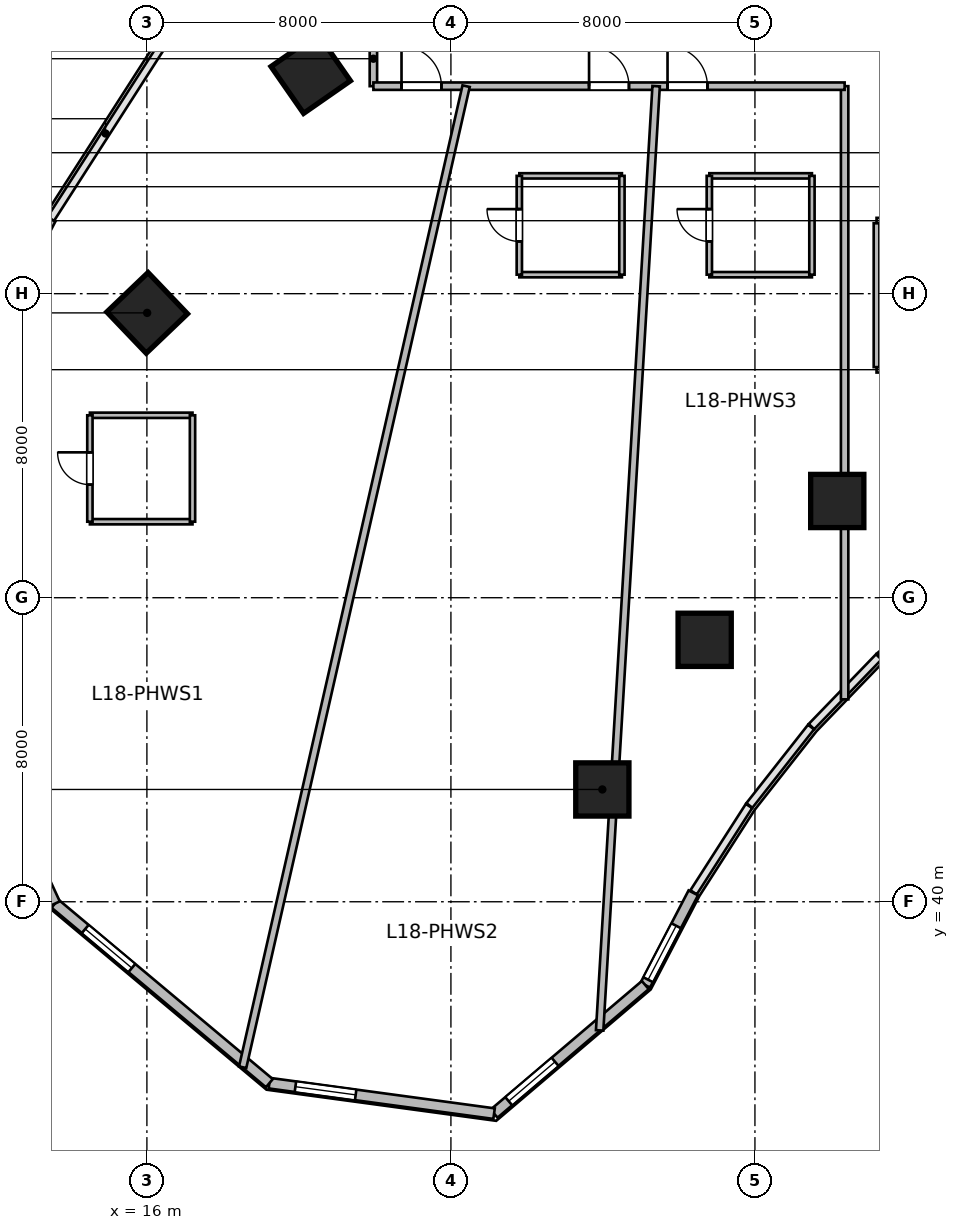
"""IFC4 building model, lengths in metres.
Left out: names, types, materials, properties, quantities, classifications, styles, units other than length and angle.
Written with IfcOpenShell. Run it as: python <this file> out.ifc"""

import sys

from ifc_helpers import new_model, si_unit, direction, frame, frame_2d, origin, origin_2d, place, context, subcontext, project, spatial, rectangle, circle, extrude, source, transform, mapped, element, fill, save


model = new_model("IFC4")
c1 = context("Model", 3, precision=1e-05, world=origin(), true_north=direction((0.0, 1.0)))
c2 = subcontext(c1, "Body", "Model", "MODEL_VIEW")
j1 = project(units=[si_unit("LENGTHUNIT", "METRE"), si_unit("PLANEANGLEUNIT", "RADIAN")], contexts=[c1])
p1 = place(None, origin())
s1 = spatial("IfcSite", under=j1, at=p1, CompositionType="ELEMENT")
p2 = place(p1, origin())
s2 = spatial("IfcBuilding", under=s1, at=p2, CompositionType="ELEMENT")
p3 = place(p2, frame((0.0, 0.0, 78.6)))
s3 = spatial("IfcBuildingStorey", under=s2, at=p3, CompositionType="ELEMENT", Elevation=78.6)
m1 = source(origin(), c2, "Body", "SweptSolid", [
    extrude(circle(Radius=0.7, at=origin_2d()), origin(), (0.0, 0.0, 1.0), 3.6),
])
p4 = place(p3, frame((27.985, 42.955, 0.0), z_axis=(0.0, 0.0, 1.0), x_axis=(-0.690756218984, 0.723087716626, 0.0)))
e1 = element("IfcColumn", 1, at=p4, inside=s3, PredefinedType="COLUMN", context=c2, shape_type="MappedRepresentation", body=[
    mapped(m1, transform((0.0, 0.0, 0.0), scale=1.0)),
])
m2 = source(origin(), c2, "Body", "SweptSolid", [
    extrude(rectangle(XDim=1.5, YDim=1.5, at=origin_2d()), origin(), (0.0, 0.0, 1.0), 3.6),
])
p5 = place(p3, frame((16.007, 55.494, 0.0), z_axis=(0.0, 0.0, 1.0), x_axis=(-0.690756218984, 0.723087716626, 0.0)))
e2 = element("IfcColumn", 2, at=p5, inside=s3, PredefinedType="COLUMN", context=c2, shape_type="MappedRepresentation", body=[
    mapped(m2, transform((0.0, 0.0, 0.0), scale=1.0)),
])
p6 = place(p3, frame((30.677, 46.892, 0.0), z_axis=(0.0, 0.0, 1.0), x_axis=(-0.571143442153, 0.820850271661, 0.0)))
e3 = element("IfcColumn", 3, at=p6, inside=s3, PredefinedType="COLUMN", context=c2, shape_type="MappedRepresentation", body=[
    mapped(m1, transform((0.0, 0.0, 0.0), scale=1.0)),
])
p7 = place(p3, frame((20.311, 61.789, 0.0), z_axis=(0.0, 0.0, 1.0), x_axis=(-0.571143442153, 0.820850271661, 0.0)))
e4 = element("IfcColumn", 4, at=p7, inside=s3, PredefinedType="COLUMN", context=c2, shape_type="MappedRepresentation", body=[
    mapped(m2, transform((0.0, 0.0, 0.0), scale=1.0)),
])
p8 = place(p3, frame((34.166, 50.545, 0.0), z_axis=(0.0, 0.0, 1.0), x_axis=(-0.436173672171, 0.899862504889, 0.0)))
e5 = element("IfcColumn", 5, at=p8, inside=s3, PredefinedType="COLUMN", context=c2, shape_type="MappedRepresentation", body=[
    mapped(m1, transform((0.0, 0.0, 0.0), scale=1.0)),
])
m3 = source(origin(), c2, "Body", "SweptSolid", [
    extrude(rectangle(XDim=2.735, YDim=0.28, at=frame_2d((1.368, 0.0))), origin(), (0.0, 0.0, 1.0), 3.36),
])
p9 = place(p3, frame((30.378, 40.234, 0.0), z_axis=(0.0, 0.0, 1.0), x_axis=(-0.46179107292, -0.886988728774, 0.0)))
e6 = element("IfcWall", 6, at=p9, inside=s3, PredefinedType="SOLIDWALL", context=c2, shape_type="MappedRepresentation", body=[
    mapped(m3, transform((0.0, 0.0, 0.0), scale=1.0)),
])
p10 = place(p9, frame((0.976, 0.0, 0.95)))
e7 = element("IfcOpeningElement", 7, at=p10, cuts=e6, PredefinedType="OPENING", context=c2, shape_type="SweptSolid", body=[
    extrude(rectangle(XDim=1.6, YDim=1.9, at=frame_2d((0.8, 0.95))), frame((0.0, 0.15, 0.0), z_axis=(0.0, -1.0, 0.0), x_axis=(1.0, 0.0, 0.0)), (0.0, 0.0, 1.0), 0.3),
])
m4 = source(origin(), c2, "Body", "SweptSolid", [
    extrude(rectangle(XDim=5.222, YDim=0.28, at=frame_2d((2.611, 0.0))), origin(), (0.0, 0.0, 1.0), 3.36),
])
p11 = place(p3, frame((29.115, 37.807, 0.0), z_axis=(0.0, 0.0, 1.0), x_axis=(-0.761900099546, -0.647694556339, 0.0)))
e8 = element("IfcWall", 8, at=p11, inside=s3, PredefinedType="SOLIDWALL", context=c2, shape_type="MappedRepresentation", body=[
    mapped(m4, transform((0.0, 0.0, 0.0), scale=1.0)),
])
p12 = place(p11, frame((3.117, 0.0, 0.95)))
e9 = element("IfcOpeningElement", 9, at=p12, cuts=e8, PredefinedType="OPENING", context=c2, shape_type="SweptSolid", body=[
    extrude(rectangle(XDim=1.6, YDim=1.9, at=frame_2d((0.8, 0.95))), frame((0.0, 0.15, 0.0), z_axis=(0.0, -1.0, 0.0), x_axis=(1.0, 0.0, 0.0)), (0.0, 0.0, 1.0), 0.3),
])
m5 = source(origin(), c2, "Body", "SweptSolid", [
    extrude(rectangle(XDim=5.967, YDim=0.28, at=frame_2d((2.984, 0.0))), origin(), (0.0, 0.0, 1.0), 3.36),
])
p13 = place(p3, frame((25.136, 34.425, 0.0), z_axis=(0.0, 0.0, 1.0), x_axis=(-0.990927009341, 0.134401124099, 0.0)))
e10 = element("IfcWall", 10, at=p13, inside=s3, PredefinedType="SOLIDWALL", context=c2, shape_type="MappedRepresentation", body=[
    mapped(m5, transform((0.0, 0.0, 0.0), scale=1.0)),
])
p14 = place(p13, frame((3.676, 0.0, 0.95)))
e11 = element("IfcOpeningElement", 11, at=p14, cuts=e10, PredefinedType="OPENING", context=c2, shape_type="SweptSolid", body=[
    extrude(rectangle(XDim=1.6, YDim=1.9, at=frame_2d((0.8, 0.95))), frame((0.0, 0.15, 0.0), z_axis=(0.0, -1.0, 0.0), x_axis=(1.0, 0.0, 0.0)), (0.0, 0.0, 1.0), 0.3),
])
m6 = source(origin(), c2, "Body", "SweptSolid", [
    extrude(rectangle(XDim=7.359, YDim=0.28, at=frame_2d((3.679, 0.0))), origin(), (0.0, 0.0, 1.0), 3.36),
])
p15 = place(p3, frame((19.223, 35.227, 0.0), z_axis=(0.0, 0.0, 1.0), x_axis=(-0.766737165543, 0.641961150675, 0.0)))
e12 = element("IfcWall", 12, at=p15, inside=s3, PredefinedType="SOLIDWALL", context=c2, shape_type="MappedRepresentation", body=[
    mapped(m6, transform((0.0, 0.0, 0.0), scale=1.0)),
])
p16 = place(p15, frame((4.719, 0.0, 0.95)))
e13 = element("IfcOpeningElement", 13, at=p16, cuts=e12, PredefinedType="OPENING", context=c2, shape_type="SweptSolid", body=[
    extrude(rectangle(XDim=1.6, YDim=1.9, at=frame_2d((0.8, 0.95))), frame((0.0, 0.15, 0.0), z_axis=(0.0, -1.0, 0.0), x_axis=(1.0, 0.0, 0.0)), (0.0, 0.0, 1.0), 0.3),
])
m7 = source(origin(), c2, "Body", "SweptSolid", [
    extrude(rectangle(XDim=7.536, YDim=0.28, at=frame_2d((3.768, 0.0))), origin(), (0.0, 0.0, 1.0), 3.36),
])
p17 = place(p3, frame((13.58, 39.951, 0.0), z_axis=(0.0, 0.0, 1.0), x_axis=(-0.41964973873, 0.907686122393, 0.0)))
e14 = element("IfcWall", 14, at=p17, inside=s3, PredefinedType="SOLIDWALL", context=c2, shape_type="MappedRepresentation", body=[
    mapped(m7, transform((0.0, 0.0, 0.0), scale=1.0)),
])
p18 = place(p17, frame((1.084, 0.0, 0.95)))
e15 = element("IfcOpeningElement", 15, at=p18, cuts=e14, PredefinedType="OPENING", context=c2, shape_type="SweptSolid", body=[
    extrude(rectangle(XDim=1.6, YDim=1.9, at=frame_2d((0.8, 0.95))), frame((0.0, 0.15, 0.0), z_axis=(0.0, -1.0, 0.0), x_axis=(1.0, 0.0, 0.0)), (0.0, 0.0, 1.0), 0.3),
])
m8 = source(origin(), c2, "Body", "SweptSolid", [
    extrude(rectangle(XDim=5.459, YDim=0.28, at=frame_2d((2.73, 0.0))), origin(), (0.0, 0.0, 1.0), 3.36),
])
p19 = place(p3, frame((10.947, 53.122, 0.0), z_axis=(0.0, 0.0, 1.0), x_axis=(0.461768054321, 0.887000712518, 0.0)))
e16 = element("IfcWall", 16, at=p19, inside=s3, PredefinedType="SOLIDWALL", context=c2, shape_type="MappedRepresentation", body=[
    mapped(m8, transform((0.0, 0.0, 0.0), scale=1.0)),
])
p20 = place(p19, frame((0.565, 0.0, 0.95)))
e17 = element("IfcOpeningElement", 17, at=p20, cuts=e16, PredefinedType="OPENING", context=c2, shape_type="SweptSolid", body=[
    extrude(rectangle(XDim=1.6, YDim=1.9, at=frame_2d((0.8, 0.95))), frame((0.0, 0.15, 0.0), z_axis=(0.0, -1.0, 0.0), x_axis=(1.0, 0.0, 0.0)), (0.0, 0.0, 1.0), 0.3),
])
m9 = source(origin(), c2, "Body", "SweptSolid", [
    extrude(rectangle(XDim=2.58, YDim=0.195, at=frame_2d((1.29, 0.0))), origin(), (0.0, 0.0, 1.0), 3.36),
])
p21 = place(p3, frame((21.96, 61.46, 0.0), z_axis=(0.0, 0.0, 1.0), x_axis=(0.0, 1.0, 0.0)))
e18 = element("IfcWall", 18, at=p21, inside=s3, PredefinedType="PARTITIONING", context=c2, shape_type="MappedRepresentation", body=[
    mapped(m9, transform((0.0, 0.0, 0.0), scale=1.0)),
])
m10 = source(origin(), c2, "Body", "SweptSolid", [
    extrude(rectangle(XDim=6.6, YDim=0.15, at=frame_2d((3.3, 0.0))), origin(), (0.0, 0.0, 1.0), 2.803),
])
p22 = place(p3, frame((35.2, 54.0, 0.0), z_axis=(0.0, 0.0, 1.0), x_axis=(1.0, 0.0, 0.0)))
e19 = element("IfcWall", 19, at=p22, inside=s3, PredefinedType="PARTITIONING", context=c2, shape_type="MappedRepresentation", body=[
    mapped(m10, transform((0.0, 0.0, 0.0), scale=1.0)),
])
m11 = source(origin(), c2, "Body", "SweptSolid", [
    extrude(rectangle(XDim=6.6, YDim=0.15, at=frame_2d((3.3, 0.0))), origin(), (0.0, 0.0, 1.0), 3.36),
])
p23 = place(p3, frame((35.2, 57.92, 0.0), z_axis=(0.0, 0.0, 1.0), x_axis=(1.0, 0.0, 0.0)))
e20 = element("IfcWall", 20, at=p23, inside=s3, PredefinedType="PARTITIONING", context=c2, shape_type="MappedRepresentation", body=[
    mapped(m11, transform((0.0, 0.0, 0.0), scale=1.0)),
])
p24 = place(p23, frame((2.85, 0.0, 0.0)))
e21 = element("IfcOpeningElement", 21, at=p24, cuts=e20, PredefinedType="OPENING", context=c2, shape_type="SweptSolid", body=[
    extrude(rectangle(XDim=0.9, YDim=2.1, at=frame_2d((0.45, 1.05))), frame((0.0, 0.085, 0.0), z_axis=(0.0, -1.0, 0.0), x_axis=(1.0, 0.0, 0.0)), (0.0, 0.0, 1.0), 0.17),
])
m12 = source(origin(), c2, "Body", "SweptSolid", [
    extrude(rectangle(XDim=3.785, YDim=0.15, at=frame_2d((1.893, 0.0))), origin(), (0.0, 0.0, 1.0), 3.36),
])
p25 = place(p3, frame((35.2, 54.067, 0.0), z_axis=(0.0, 0.0, 1.0), x_axis=(0.0, 1.0, 0.0)))
e22 = element("IfcWall", 22, at=p25, inside=s3, PredefinedType="PARTITIONING", context=c2, shape_type="MappedRepresentation", body=[
    mapped(m12, transform((0.0, 0.0, 0.0), scale=1.0)),
])
m13 = source(origin(), c2, "Body", "SweptSolid", [
    extrude(rectangle(XDim=16.134, YDim=0.195, at=frame_2d((8.067, 0.0))), origin(), (0.0, 0.0, 1.0), 3.36),
])
p26 = place(p3, frame((34.36, 45.326, 0.0), z_axis=(0.0, 0.0, 1.0), x_axis=(0.0, 1.0, 0.0)))
e23 = element("IfcWall", 23, at=p26, inside=s3, PredefinedType="PARTITIONING", context=c2, shape_type="MappedRepresentation", body=[
    mapped(m13, transform((0.0, 0.0, 0.0), scale=1.0)),
])
m14 = source(origin(), c2, "Body", "SweptSolid", [
    extrude(rectangle(XDim=12.4, YDim=0.195, at=frame_2d((6.2, 0.0))), origin(), (0.0, 0.0, 1.0), 3.36),
])
p27 = place(p3, frame((21.96, 61.46, 0.0), z_axis=(0.0, 0.0, 1.0), x_axis=(1.0, 0.0, 0.0)))
e24 = element("IfcWall", 24, at=p27, inside=s3, PredefinedType="PARTITIONING", context=c2, shape_type="MappedRepresentation", body=[
    mapped(m14, transform((0.0, 0.0, 0.0), scale=1.0)),
])
p28 = place(p27, frame((0.74, 0.0, 0.0)))
e25 = element("IfcOpeningElement", 25, at=p28, cuts=e24, PredefinedType="OPENING", context=c2, shape_type="SweptSolid", body=[
    extrude(rectangle(XDim=1.05, YDim=2.15, at=frame_2d((0.525, 1.075))), frame((0.0, 0.107, 0.0), z_axis=(0.0, -1.0, 0.0), x_axis=(1.0, 0.0, 0.0)), (0.0, 0.0, 1.0), 0.215),
])
p29 = place(p27, frame((5.675, 0.0, 0.0)))
e26 = element("IfcOpeningElement", 26, at=p29, cuts=e24, PredefinedType="OPENING", context=c2, shape_type="SweptSolid", body=[
    extrude(rectangle(XDim=1.05, YDim=2.15, at=frame_2d((0.525, 1.075))), frame((0.0, 0.107, 0.0), z_axis=(0.0, -1.0, 0.0), x_axis=(1.0, 0.0, 0.0)), (0.0, 0.0, 1.0), 0.215),
])
p30 = place(p27, frame((7.74, 0.0, 0.0)))
e27 = element("IfcOpeningElement", 27, at=p30, cuts=e24, PredefinedType="OPENING", context=c2, shape_type="SweptSolid", body=[
    extrude(rectangle(XDim=1.05, YDim=2.15, at=frame_2d((0.525, 1.075))), frame((0.0, 0.107, 0.0), z_axis=(0.0, -1.0, 0.0), x_axis=(1.0, 0.0, 0.0)), (0.0, 0.0, 1.0), 0.215),
])
m15 = source(origin(), c2, "Body", "SweptSolid", [
    extrude(rectangle(XDim=26.476, YDim=0.195, at=frame_2d((13.238, 0.0))), origin(), (0.0, 0.0, 1.0), 2.88),
])
p31 = place(p3, frame((18.52, 35.646, 0.0), z_axis=(0.0, 0.0, 1.0), x_axis=(0.22210613157, 0.975022495289, 0.0)))
e28 = element("IfcWall", 28, at=p31, inside=s3, PredefinedType="PARTITIONING", context=c2, shape_type="MappedRepresentation", body=[
    mapped(m15, transform((0.0, 0.0, 0.0), scale=1.0)),
])
m16 = source(origin(), c2, "Body", "SweptSolid", [
    extrude(rectangle(XDim=24.889, YDim=0.195, at=frame_2d((12.444, 0.0))), origin(), (0.0, 0.0, 1.0), 2.644),
])
p32 = place(p3, frame((27.914, 36.616, 0.0), z_axis=(0.0, 0.0, 1.0), x_axis=(0.059709317989, 0.998215807, 0.0)))
e29 = element("IfcWall", 29, at=p32, inside=s3, PredefinedType="PARTITIONING", context=c2, shape_type="MappedRepresentation", body=[
    mapped(m16, transform((0.0, 0.0, 0.0), scale=1.0)),
])
m17 = source(origin(), c2, "Body", "SweptSolid", [
    extrude(rectangle(XDim=2.7, YDim=0.14, at=frame_2d((1.35, 0.0))), origin(), (0.0, 0.0, 1.0), 3.36),
])
for number, where, z_axis, x_axis in (
    (30, (14.5, 52.8, 0.0), (0.0, 0.0, 1.0), (1.0, 0.0, 0.0)),
    (31, (14.5, 50.0, 0.0), (0.0, 0.0, 1.0), (1.0, 0.0, 0.0)),
):
    element("IfcWall", number, at=place(p3, frame(where, z_axis=z_axis, x_axis=x_axis)), inside=s3, PredefinedType="PARTITIONING", context=c2, shape_type="MappedRepresentation", body=[
        mapped(m17, transform((0.0, 0.0, 0.0), scale=1.0)),
    ])
m18 = source(origin(), c2, "Body", "SweptSolid", [
    extrude(rectangle(XDim=2.8, YDim=0.14, at=frame_2d((1.4, 0.0))), origin(), (0.0, 0.0, 1.0), 3.36),
])
p33 = place(p3, frame((14.5, 50.0, 0.0), z_axis=(0.0, 0.0, 1.0), x_axis=(0.0, 1.0, 0.0)))
e32 = element("IfcWall", 32, at=p33, inside=s3, PredefinedType="PARTITIONING", context=c2, shape_type="MappedRepresentation", body=[
    mapped(m18, transform((0.0, 0.0, 0.0), scale=1.0)),
])
p34 = place(p33, frame((0.975, 0.0, 0.0)))
e33 = element("IfcOpeningElement", 33, at=p34, cuts=e32, PredefinedType="OPENING", context=c2, shape_type="SweptSolid", body=[
    extrude(rectangle(XDim=0.85, YDim=2.05, at=frame_2d((0.425, 1.025))), frame((0.0, 0.08, 0.0), z_axis=(0.0, -1.0, 0.0), x_axis=(1.0, 0.0, 0.0)), (0.0, 0.0, 1.0), 0.16),
])
p35 = place(p3, frame((17.2, 50.0, 0.0), z_axis=(0.0, 0.0, 1.0), x_axis=(0.0, 1.0, 0.0)))
e34 = element("IfcWall", 34, at=p35, inside=s3, PredefinedType="PARTITIONING", context=c2, shape_type="MappedRepresentation", body=[
    mapped(m18, transform((0.0, 0.0, 0.0), scale=1.0)),
])
for number, where, z_axis, x_axis in (
    (35, (25.8, 59.1, 0.0), (0.0, 0.0, 1.0), (1.0, 0.0, 0.0)),
    (36, (25.8, 56.5, 0.0), (0.0, 0.0, 1.0), (1.0, 0.0, 0.0)),
):
    element("IfcWall", number, at=place(p3, frame(where, z_axis=z_axis, x_axis=x_axis)), inside=s3, PredefinedType="PARTITIONING", context=c2, shape_type="MappedRepresentation", body=[
        mapped(m17, transform((0.0, 0.0, 0.0), scale=1.0)),
    ])
m19 = source(origin(), c2, "Body", "SweptSolid", [
    extrude(rectangle(XDim=2.6, YDim=0.14, at=frame_2d((1.3, 0.0))), origin(), (0.0, 0.0, 1.0), 3.36),
])
p36 = place(p3, frame((25.8, 56.5, 0.0), z_axis=(0.0, 0.0, 1.0), x_axis=(0.0, 1.0, 0.0)))
e37 = element("IfcWall", 37, at=p36, inside=s3, PredefinedType="PARTITIONING", context=c2, shape_type="MappedRepresentation", body=[
    mapped(m19, transform((0.0, 0.0, 0.0), scale=1.0)),
])
p37 = place(p36, frame((0.875, 0.0, 0.0)))
e38 = element("IfcOpeningElement", 38, at=p37, cuts=e37, PredefinedType="OPENING", context=c2, shape_type="SweptSolid", body=[
    extrude(rectangle(XDim=0.85, YDim=2.05, at=frame_2d((0.425, 1.025))), frame((0.0, 0.08, 0.0), z_axis=(0.0, -1.0, 0.0), x_axis=(1.0, 0.0, 0.0)), (0.0, 0.0, 1.0), 0.16),
])
m20 = source(origin(), c2, "Body", "SweptSolid", [
    extrude(rectangle(XDim=2.6, YDim=0.14, at=frame_2d((1.3, 0.0))), origin(), (0.0, 0.0, 1.0), 2.88),
])
p38 = place(p3, frame((28.5, 56.5, 0.0), z_axis=(0.0, 0.0, 1.0), x_axis=(0.0, 1.0, 0.0)))
e39 = element("IfcWall", 39, at=p38, inside=s3, PredefinedType="PARTITIONING", context=c2, shape_type="MappedRepresentation", body=[
    mapped(m20, transform((0.0, 0.0, 0.0), scale=1.0)),
])
for number, where, z_axis, x_axis in (
    (40, (30.8, 59.1, 0.0), (0.0, 0.0, 1.0), (1.0, 0.0, 0.0)),
    (41, (30.8, 56.5, 0.0), (0.0, 0.0, 1.0), (1.0, 0.0, 0.0)),
):
    element("IfcWall", number, at=place(p3, frame(where, z_axis=z_axis, x_axis=x_axis)), inside=s3, PredefinedType="PARTITIONING", context=c2, shape_type="MappedRepresentation", body=[
        mapped(m17, transform((0.0, 0.0, 0.0), scale=1.0)),
    ])
m21 = source(origin(), c2, "Body", "SweptSolid", [
    extrude(rectangle(XDim=2.6, YDim=0.14, at=frame_2d((1.3, 0.0))), origin(), (0.0, 0.0, 1.0), 2.644),
])
p39 = place(p3, frame((30.8, 56.5, 0.0), z_axis=(0.0, 0.0, 1.0), x_axis=(0.0, 1.0, 0.0)))
e42 = element("IfcWall", 42, at=p39, inside=s3, PredefinedType="PARTITIONING", context=c2, shape_type="MappedRepresentation", body=[
    mapped(m21, transform((0.0, 0.0, 0.0), scale=1.0)),
])
p40 = place(p39, frame((0.875, 0.0, 0.0)))
e43 = element("IfcOpeningElement", 43, at=p40, cuts=e42, PredefinedType="OPENING", context=c2, shape_type="SweptSolid", body=[
    extrude(rectangle(XDim=0.85, YDim=2.05, at=frame_2d((0.425, 1.025))), frame((0.0, 0.08, 0.0), z_axis=(0.0, -1.0, 0.0), x_axis=(1.0, 0.0, 0.0)), (0.0, 0.0, 1.0), 0.16),
])
p41 = place(p3, frame((33.5, 56.5, 0.0), z_axis=(0.0, 0.0, 1.0), x_axis=(0.0, 1.0, 0.0)))
e44 = element("IfcWall", 44, at=p41, inside=s3, PredefinedType="PARTITIONING", context=c2, shape_type="MappedRepresentation", body=[
    mapped(m19, transform((0.0, 0.0, 0.0), scale=1.0)),
])
m22 = source(origin(), c2, "Body", "SweptSolid", [
    extrude(rectangle(XDim=1.6, YDim=1.9, at=frame_2d((0.8, 0.95))), frame((0.0, 0.03, 0.0), z_axis=(0.0, -1.0, 0.0), x_axis=(1.0, 0.0, 0.0)), (0.0, 0.0, 1.0), 0.06),
])
p42 = place(p10, origin())
e45 = element("IfcWindow", 45, at=p42, inside=s3, PartitioningType="SINGLE_PANEL", PredefinedType="WINDOW", context=c2, shape_type="MappedRepresentation", body=[
    mapped(m22, transform((0.0, 0.0, 0.0), scale=1.0)),
])
fill(e7, e45)
p43 = place(p12, origin())
e46 = element("IfcWindow", 46, at=p43, inside=s3, PartitioningType="SINGLE_PANEL", PredefinedType="WINDOW", context=c2, shape_type="MappedRepresentation", body=[
    mapped(m22, transform((0.0, 0.0, 0.0), scale=1.0)),
])
fill(e9, e46)
p44 = place(p14, origin())
e47 = element("IfcWindow", 47, at=p44, inside=s3, PartitioningType="SINGLE_PANEL", PredefinedType="WINDOW", context=c2, shape_type="MappedRepresentation", body=[
    mapped(m22, transform((0.0, 0.0, 0.0), scale=1.0)),
])
fill(e11, e47)
p45 = place(p16, origin())
e48 = element("IfcWindow", 48, at=p45, inside=s3, PartitioningType="SINGLE_PANEL", PredefinedType="WINDOW", context=c2, shape_type="MappedRepresentation", body=[
    mapped(m22, transform((0.0, 0.0, 0.0), scale=1.0)),
])
fill(e13, e48)
m23 = source(origin(), c2, "Body", "SweptSolid", [
    extrude(rectangle(XDim=1.05, YDim=2.15, at=frame_2d((0.525, 1.075))), frame((0.0, 0.025, 0.0), z_axis=(0.0, -1.0, 0.0), x_axis=(1.0, 0.0, 0.0)), (0.0, 0.0, 1.0), 0.05),
])
p46 = place(p28, origin())
e49 = element("IfcDoor", 49, at=p46, inside=s3, OperationType="SINGLE_SWING_LEFT", PredefinedType="DOOR", context=c2, shape_type="MappedRepresentation", body=[
    mapped(m23, transform((0.0, 0.0, 0.0), scale=1.0)),
])
fill(e25, e49)
m24 = source(origin(), c2, "Body", "SweptSolid", [
    extrude(rectangle(XDim=0.85, YDim=2.05, at=frame_2d((0.425, 1.025))), frame((0.0, 0.025, 0.0), z_axis=(0.0, -1.0, 0.0), x_axis=(1.0, 0.0, 0.0)), (0.0, 0.0, 1.0), 0.05),
])
p47 = place(p34, origin())
e50 = element("IfcDoor", 50, at=p47, inside=s3, OperationType="SINGLE_SWING_RIGHT", PredefinedType="DOOR", context=c2, shape_type="MappedRepresentation", body=[
    mapped(m24, transform((0.0, 0.0, 0.0), scale=1.0)),
])
fill(e33, e50)
p48 = place(p29, origin())
e51 = element("IfcDoor", 51, at=p48, inside=s3, OperationType="SINGLE_SWING_LEFT", PredefinedType="DOOR", context=c2, shape_type="MappedRepresentation", body=[
    mapped(m23, transform((0.0, 0.0, 0.0), scale=1.0)),
])
fill(e26, e51)
p49 = place(p37, origin())
e52 = element("IfcDoor", 52, at=p49, inside=s3, OperationType="SINGLE_SWING_RIGHT", PredefinedType="DOOR", context=c2, shape_type="MappedRepresentation", body=[
    mapped(m24, transform((0.0, 0.0, 0.0), scale=1.0)),
])
fill(e38, e52)
p50 = place(p30, origin())
e53 = element("IfcDoor", 53, at=p50, inside=s3, OperationType="SINGLE_SWING_LEFT", PredefinedType="DOOR", context=c2, shape_type="MappedRepresentation", body=[
    mapped(m23, transform((0.0, 0.0, 0.0), scale=1.0)),
])
fill(e27, e53)
p51 = place(p40, origin())
e54 = element("IfcDoor", 54, at=p51, inside=s3, OperationType="SINGLE_SWING_RIGHT", PredefinedType="DOOR", context=c2, shape_type="MappedRepresentation", body=[
    mapped(m24, transform((0.0, 0.0, 0.0), scale=1.0)),
])
fill(e43, e54)
save(model, sys.argv[1])
